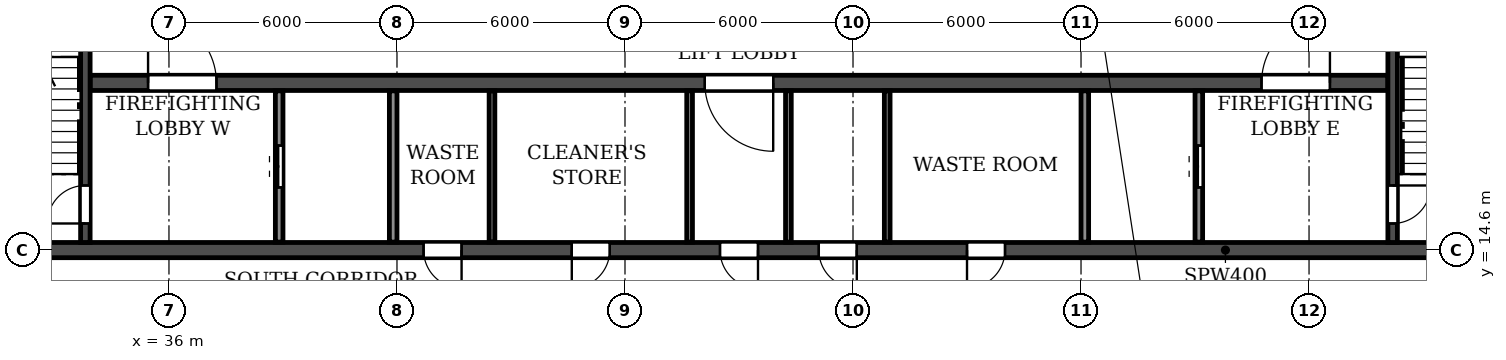
"""IFC4 building model, lengths in metres.
Left out: names, types, materials, properties, quantities, classifications, styles, units other than length and angle.
Written with IfcOpenShell. Run it as: python <this file> out.ifc"""

import sys

from ifc_helpers import new_model, si_unit, direction, frame, frame_2d, origin, place, context, subcontext, project, spatial, rectangle, extrude, element, fill, save


model = new_model("IFC4")
c1 = context("Model", 3, precision=1e-05, world=origin(), true_north=direction((0.0, 1.0)))
c2 = subcontext(c1, "Body", "Model", "MODEL_VIEW")
j1 = project(units=[si_unit("LENGTHUNIT", "METRE"), si_unit("PLANEANGLEUNIT", "RADIAN")], contexts=[c1])
p1 = place(None, origin())
s1 = spatial("IfcSite", under=j1, at=p1, CompositionType="ELEMENT")
p2 = place(p1, origin())
s2 = spatial("IfcBuilding", under=s1, at=p2, CompositionType="ELEMENT")
p3 = place(p2, frame((0.0, 0.0, 181.8)))
s3 = spatial("IfcBuildingStorey", under=s2, at=p3, CompositionType="ELEMENT", Elevation=181.8)
p4 = place(p3, frame((18.2, 14.6, 0.0), z_axis=(0.0, 0.0, 1.0), x_axis=(1.0, 0.0, 0.0)))
e1 = element("IfcWall", 1, at=p4, inside=s3, PredefinedType="SOLIDWALL", context=c2, shape_type="SweptSolid", body=[
    extrude(rectangle(XDim=65.6, YDim=0.4, at=frame_2d((32.8, 0.0))), origin(), (0.0, 0.0, 1.0), 3.08),
])
p5 = place(p4, frame((0.7, 0.0, 0.0)))
e2 = element("IfcOpeningElement", 2, at=p5, cuts=e1, PredefinedType="OPENING", context=c2, shape_type="SweptSolid", body=[
    extrude(rectangle(XDim=1.0, YDim=2.1, at=frame_2d((0.5, 1.05))), frame((0.0, 0.21, 0.0), z_axis=(0.0, -1.0, 0.0), x_axis=(1.0, 0.0, 0.0)), (0.0, 0.0, 1.0), 0.42),
])
p6 = place(p4, frame((8.6, 0.0, 0.0)))
e3 = element("IfcOpeningElement", 3, at=p6, cuts=e1, PredefinedType="OPENING", context=c2, shape_type="SweptSolid", body=[
    extrude(rectangle(XDim=1.0, YDim=2.1, at=frame_2d((0.5, 1.05))), frame((0.0, 0.21, 0.0), z_axis=(0.0, -1.0, 0.0), x_axis=(1.0, 0.0, 0.0)), (0.0, 0.0, 1.0), 0.42),
])
p7 = place(p4, frame((13.2, 0.0, 0.0)))
e4 = element("IfcOpeningElement", 4, at=p7, cuts=e1, PredefinedType="OPENING", context=c2, shape_type="SweptSolid", body=[
    extrude(rectangle(XDim=1.0, YDim=2.1, at=frame_2d((0.5, 1.05))), frame((0.0, 0.21, 0.0), z_axis=(0.0, -1.0, 0.0), x_axis=(1.0, 0.0, 0.0)), (0.0, 0.0, 1.0), 0.42),
])
p8 = place(p4, frame((24.5, 0.0, 0.0)))
e5 = element("IfcOpeningElement", 5, at=p8, cuts=e1, PredefinedType="OPENING", context=c2, shape_type="SweptSolid", body=[
    extrude(rectangle(XDim=1.0, YDim=2.1, at=frame_2d((0.5, 1.05))), frame((0.0, 0.21, 0.0), z_axis=(0.0, -1.0, 0.0), x_axis=(1.0, 0.0, 0.0)), (0.0, 0.0, 1.0), 0.42),
])
p9 = place(p4, frame((28.4, 0.0, 0.0)))
e6 = element("IfcOpeningElement", 6, at=p9, cuts=e1, PredefinedType="OPENING", context=c2, shape_type="SweptSolid", body=[
    extrude(rectangle(XDim=1.0, YDim=2.1, at=frame_2d((0.5, 1.05))), frame((0.0, 0.21, 0.0), z_axis=(0.0, -1.0, 0.0), x_axis=(1.0, 0.0, 0.0)), (0.0, 0.0, 1.0), 0.42),
])
p10 = place(p4, frame((32.3, 0.0, 0.0)))
e7 = element("IfcOpeningElement", 7, at=p10, cuts=e1, PredefinedType="OPENING", context=c2, shape_type="SweptSolid", body=[
    extrude(rectangle(XDim=1.0, YDim=2.1, at=frame_2d((0.5, 1.05))), frame((0.0, 0.21, 0.0), z_axis=(0.0, -1.0, 0.0), x_axis=(1.0, 0.0, 0.0)), (0.0, 0.0, 1.0), 0.42),
])
p11 = place(p4, frame((34.9, 0.0, 0.0)))
e8 = element("IfcOpeningElement", 8, at=p11, cuts=e1, PredefinedType="OPENING", context=c2, shape_type="SweptSolid", body=[
    extrude(rectangle(XDim=1.0, YDim=2.1, at=frame_2d((0.5, 1.05))), frame((0.0, 0.21, 0.0), z_axis=(0.0, -1.0, 0.0), x_axis=(1.0, 0.0, 0.0)), (0.0, 0.0, 1.0), 0.42),
])
p12 = place(p4, frame((38.8, 0.0, 0.0)))
e9 = element("IfcOpeningElement", 9, at=p12, cuts=e1, PredefinedType="OPENING", context=c2, shape_type="SweptSolid", body=[
    extrude(rectangle(XDim=1.0, YDim=2.1, at=frame_2d((0.5, 1.05))), frame((0.0, 0.21, 0.0), z_axis=(0.0, -1.0, 0.0), x_axis=(1.0, 0.0, 0.0)), (0.0, 0.0, 1.0), 0.42),
])
p13 = place(p4, frame((51.4, 0.0, 0.0)))
e10 = element("IfcOpeningElement", 10, at=p13, cuts=e1, PredefinedType="OPENING", context=c2, shape_type="SweptSolid", body=[
    extrude(rectangle(XDim=1.0, YDim=2.1, at=frame_2d((0.5, 1.05))), frame((0.0, 0.21, 0.0), z_axis=(0.0, -1.0, 0.0), x_axis=(1.0, 0.0, 0.0)), (0.0, 0.0, 1.0), 0.42),
])
p14 = place(p4, frame((56.0, 0.0, 0.0)))
e11 = element("IfcOpeningElement", 11, at=p14, cuts=e1, PredefinedType="OPENING", context=c2, shape_type="SweptSolid", body=[
    extrude(rectangle(XDim=1.0, YDim=2.1, at=frame_2d((0.5, 1.05))), frame((0.0, 0.21, 0.0), z_axis=(0.0, -1.0, 0.0), x_axis=(1.0, 0.0, 0.0)), (0.0, 0.0, 1.0), 0.42),
])
p15 = place(p4, frame((63.9, 0.0, 0.0)))
e12 = element("IfcOpeningElement", 12, at=p15, cuts=e1, PredefinedType="OPENING", context=c2, shape_type="SweptSolid", body=[
    extrude(rectangle(XDim=1.0, YDim=2.1, at=frame_2d((0.5, 1.05))), frame((0.0, 0.21, 0.0), z_axis=(0.0, -1.0, 0.0), x_axis=(1.0, 0.0, 0.0)), (0.0, 0.0, 1.0), 0.42),
])
p16 = place(p3, frame((33.925, 19.0, 0.0), z_axis=(0.0, 0.0, 1.0), x_axis=(1.0, 0.0, 0.0)))
e13 = element("IfcWall", 13, at=p16, inside=s3, PredefinedType="SOLIDWALL", context=c2, shape_type="SweptSolid", body=[
    extrude(rectangle(XDim=34.15, YDim=0.4, at=frame_2d((17.075, 0.0))), origin(), (0.0, 0.0, 1.0), 3.08),
])
p17 = place(p16, frame((16.175, 0.0, 0.0)))
e14 = element("IfcOpeningElement", 14, at=p17, cuts=e13, PredefinedType="OPENING", context=c2, shape_type="SweptSolid", body=[
    extrude(rectangle(XDim=1.8, YDim=2.1, at=frame_2d((0.9, 1.05))), frame((0.0, 0.21, 0.0), z_axis=(0.0, -1.0, 0.0), x_axis=(1.0, 0.0, 0.0)), (0.0, 0.0, 1.0), 0.42),
])
p18 = place(p16, frame((1.525, 0.0, 0.0)))
e15 = element("IfcOpeningElement", 15, at=p18, cuts=e13, PredefinedType="OPENING", context=c2, shape_type="SweptSolid", body=[
    extrude(rectangle(XDim=1.8, YDim=2.1, at=frame_2d((0.9, 1.05))), frame((0.0, 0.21, 0.0), z_axis=(0.0, -1.0, 0.0), x_axis=(1.0, 0.0, 0.0)), (0.0, 0.0, 1.0), 0.42),
])
p19 = place(p16, frame((30.825, 0.0, 0.0)))
e16 = element("IfcOpeningElement", 16, at=p19, cuts=e13, PredefinedType="OPENING", context=c2, shape_type="SweptSolid", body=[
    extrude(rectangle(XDim=1.8, YDim=2.1, at=frame_2d((0.9, 1.05))), frame((0.0, 0.21, 0.0), z_axis=(0.0, -1.0, 0.0), x_axis=(1.0, 0.0, 0.0)), (0.0, 0.0, 1.0), 0.42),
])
p20 = place(p3, frame((33.8, 14.8, 0.0), z_axis=(0.0, 0.0, 1.0), x_axis=(0.0, 1.0, 0.0)))
e17 = element("IfcWall", 17, at=p20, inside=s3, PredefinedType="SOLIDWALL", context=c2, shape_type="SweptSolid", body=[
    extrude(rectangle(XDim=7.675, YDim=0.25, at=frame_2d((3.837, 0.0))), origin(), (0.0, 0.0, 1.0), 3.08),
])
p21 = place(p20, frame((0.5, 0.0, 0.0)))
e18 = element("IfcOpeningElement", 18, at=p21, cuts=e17, PredefinedType="OPENING", context=c2, shape_type="SweptSolid", body=[
    extrude(rectangle(XDim=1.0, YDim=2.1, at=frame_2d((0.5, 1.05))), frame((0.0, 0.135, 0.0), z_axis=(0.0, -1.0, 0.0), x_axis=(1.0, 0.0, 0.0)), (0.0, 0.0, 1.0), 0.27),
])
p22 = place(p3, frame((68.2, 14.8, 0.0), z_axis=(0.0, 0.0, 1.0), x_axis=(0.0, 1.0, 0.0)))
e19 = element("IfcWall", 19, at=p22, inside=s3, PredefinedType="SOLIDWALL", context=c2, shape_type="SweptSolid", body=[
    extrude(rectangle(XDim=7.675, YDim=0.25, at=frame_2d((3.837, 0.0))), origin(), (0.0, 0.0, 1.0), 3.08),
])
p23 = place(p22, frame((0.5, 0.0, 0.0)))
e20 = element("IfcOpeningElement", 20, at=p23, cuts=e19, PredefinedType="OPENING", context=c2, shape_type="SweptSolid", body=[
    extrude(rectangle(XDim=1.0, YDim=2.1, at=frame_2d((0.5, 1.05))), frame((0.0, 0.135, 0.0), z_axis=(0.0, -1.0, 0.0), x_axis=(1.0, 0.0, 0.0)), (0.0, 0.0, 1.0), 0.27),
])
for number, where, z_axis, x_axis in (
    (21, (49.7, 14.81, 0.0), (0.0, 0.0, 1.0), (0.0, 1.0, 0.0)),
    (22, (52.3, 14.81, 0.0), (0.0, 0.0, 1.0), (0.0, 1.0, 0.0)),
    (23, (44.5, 14.81, 0.0), (0.0, 0.0, 1.0), (0.0, 1.0, 0.0)),
    (24, (54.9, 14.81, 0.0), (0.0, 0.0, 1.0), (0.0, 1.0, 0.0)),
):
    element("IfcWall", number, at=place(p3, frame(where, z_axis=z_axis, x_axis=x_axis)), inside=s3, PredefinedType="PARTITIONING", context=c2, shape_type="SweptSolid", body=[
        extrude(rectangle(XDim=3.98, YDim=0.15, at=frame_2d((1.99, 0.0))), origin(), (0.0, 0.0, 1.0), 3.08),
    ])
p24 = place(p3, frame((38.9, 14.81, 0.0), z_axis=(0.0, 0.0, 1.0), x_axis=(0.0, 1.0, 0.0)))
e25 = element("IfcWall", 25, at=p24, inside=s3, PredefinedType="PARTITIONING", context=c2, shape_type="SweptSolid", body=[
    extrude(rectangle(XDim=3.98, YDim=0.2, at=frame_2d((1.99, 0.0))), origin(), (0.0, 0.0, 1.0), 3.08),
])
p25 = place(p24, frame((1.44, 0.0, 0.0)))
e26 = element("IfcOpeningElement", 26, at=p25, cuts=e25, PredefinedType="OPENING", context=c2, shape_type="SweptSolid", body=[
    extrude(rectangle(XDim=1.1, YDim=2.1, at=frame_2d((0.55, 1.05))), frame((0.0, 0.11, 0.0), z_axis=(0.0, -1.0, 0.0), x_axis=(1.0, 0.0, 0.0)), (0.0, 0.0, 1.0), 0.22),
])
for number, where, z_axis, x_axis in (
    (27, (41.9, 14.81, 0.0), (0.0, 0.0, 1.0), (0.0, 1.0, 0.0)),
    (28, (60.1, 14.81, 0.0), (0.0, 0.0, 1.0), (0.0, 1.0, 0.0)),
):
    element("IfcWall", number, at=place(p3, frame(where, z_axis=z_axis, x_axis=x_axis)), inside=s3, PredefinedType="PARTITIONING", context=c2, shape_type="SweptSolid", body=[
        extrude(rectangle(XDim=3.98, YDim=0.2, at=frame_2d((1.99, 0.0))), origin(), (0.0, 0.0, 1.0), 3.08),
    ])
p26 = place(p3, frame((63.1, 14.81, 0.0), z_axis=(0.0, 0.0, 1.0), x_axis=(0.0, 1.0, 0.0)))
e29 = element("IfcWall", 29, at=p26, inside=s3, PredefinedType="PARTITIONING", context=c2, shape_type="SweptSolid", body=[
    extrude(rectangle(XDim=3.98, YDim=0.2, at=frame_2d((1.99, 0.0))), origin(), (0.0, 0.0, 1.0), 3.08),
])
p27 = place(p26, frame((1.44, 0.0, 0.0)))
e30 = element("IfcOpeningElement", 30, at=p27, cuts=e29, PredefinedType="OPENING", context=c2, shape_type="SweptSolid", body=[
    extrude(rectangle(XDim=1.1, YDim=2.1, at=frame_2d((0.55, 1.05))), frame((0.0, 0.11, 0.0), z_axis=(0.0, -1.0, 0.0), x_axis=(1.0, 0.0, 0.0)), (0.0, 0.0, 1.0), 0.22),
])
p28 = place(p8, frame((1.0, 0.0, 0.0), z_axis=(0.0, 0.0, 1.0), x_axis=(-1.0, 0.0, 0.0)))
e31 = element("IfcDoor", 31, at=p28, inside=s3, OperationType="SINGLE_SWING_LEFT", PredefinedType="DOOR", context=c2, shape_type="SweptSolid", body=[
    extrude(rectangle(XDim=1.0, YDim=2.1, at=frame_2d((0.5, 1.05))), frame((0.0, 0.025, 0.0), z_axis=(0.0, -1.0, 0.0), x_axis=(1.0, 0.0, 0.0)), (0.0, 0.0, 1.0), 0.05),
])
fill(e5, e31)
p29 = place(p9, frame((1.0, 0.0, 0.0), z_axis=(0.0, 0.0, 1.0), x_axis=(-1.0, 0.0, 0.0)))
e32 = element("IfcDoor", 32, at=p29, inside=s3, OperationType="SINGLE_SWING_RIGHT", PredefinedType="DOOR", context=c2, shape_type="SweptSolid", body=[
    extrude(rectangle(XDim=1.0, YDim=2.1, at=frame_2d((0.5, 1.05))), frame((0.0, 0.025, 0.0), z_axis=(0.0, -1.0, 0.0), x_axis=(1.0, 0.0, 0.0)), (0.0, 0.0, 1.0), 0.05),
])
fill(e6, e32)
p30 = place(p10, frame((1.0, 0.0, 0.0), z_axis=(0.0, 0.0, 1.0), x_axis=(-1.0, 0.0, 0.0)))
e33 = element("IfcDoor", 33, at=p30, inside=s3, OperationType="SINGLE_SWING_LEFT", PredefinedType="DOOR", context=c2, shape_type="SweptSolid", body=[
    extrude(rectangle(XDim=1.0, YDim=2.1, at=frame_2d((0.5, 1.05))), frame((0.0, 0.025, 0.0), z_axis=(0.0, -1.0, 0.0), x_axis=(1.0, 0.0, 0.0)), (0.0, 0.0, 1.0), 0.05),
])
fill(e7, e33)
p31 = place(p11, frame((1.0, 0.0, 0.0), z_axis=(0.0, 0.0, 1.0), x_axis=(-1.0, 0.0, 0.0)))
e34 = element("IfcDoor", 34, at=p31, inside=s3, OperationType="SINGLE_SWING_LEFT", PredefinedType="DOOR", context=c2, shape_type="SweptSolid", body=[
    extrude(rectangle(XDim=1.0, YDim=2.1, at=frame_2d((0.5, 1.05))), frame((0.0, 0.025, 0.0), z_axis=(0.0, -1.0, 0.0), x_axis=(1.0, 0.0, 0.0)), (0.0, 0.0, 1.0), 0.05),
])
fill(e8, e34)
p32 = place(p12, frame((1.0, 0.0, 0.0), z_axis=(0.0, 0.0, 1.0), x_axis=(-1.0, 0.0, 0.0)))
e35 = element("IfcDoor", 35, at=p32, inside=s3, OperationType="SINGLE_SWING_RIGHT", PredefinedType="DOOR", context=c2, shape_type="SweptSolid", body=[
    extrude(rectangle(XDim=1.0, YDim=2.1, at=frame_2d((0.5, 1.05))), frame((0.0, 0.025, 0.0), z_axis=(0.0, -1.0, 0.0), x_axis=(1.0, 0.0, 0.0)), (0.0, 0.0, 1.0), 0.05),
])
fill(e9, e35)
p33 = place(p27, origin())
e36 = element("IfcDoor", 36, at=p33, inside=s3, OperationType="DOUBLE_DOOR_SLIDING", PredefinedType="DOOR", context=c2, shape_type="SweptSolid", body=[
    extrude(rectangle(XDim=1.1, YDim=2.1, at=frame_2d((0.55, 1.05))), frame((0.0, 0.025, 0.0), z_axis=(0.0, -1.0, 0.0), x_axis=(1.0, 0.0, 0.0)), (0.0, 0.0, 1.0), 0.05),
])
fill(e30, e36)
p34 = place(p23, frame((1.0, 0.0, 0.0), z_axis=(0.0, 0.0, 1.0), x_axis=(-1.0, 0.0, 0.0)))
e37 = element("IfcDoor", 37, at=p34, inside=s3, OperationType="SINGLE_SWING_LEFT", PredefinedType="DOOR", context=c2, shape_type="SweptSolid", body=[
    extrude(rectangle(XDim=1.0, YDim=2.1, at=frame_2d((0.5, 1.05))), frame((0.0, 0.025, 0.0), z_axis=(0.0, -1.0, 0.0), x_axis=(1.0, 0.0, 0.0)), (0.0, 0.0, 1.0), 0.05),
])
fill(e20, e37)
p35 = place(p21, origin())
e38 = element("IfcDoor", 38, at=p35, inside=s3, OperationType="SINGLE_SWING_LEFT", PredefinedType="DOOR", context=c2, shape_type="SweptSolid", body=[
    extrude(rectangle(XDim=1.0, YDim=2.1, at=frame_2d((0.5, 1.05))), frame((0.0, 0.025, 0.0), z_axis=(0.0, -1.0, 0.0), x_axis=(1.0, 0.0, 0.0)), (0.0, 0.0, 1.0), 0.05),
])
fill(e18, e38)
p36 = place(p25, origin())
e39 = element("IfcDoor", 39, at=p36, inside=s3, OperationType="DOUBLE_DOOR_SLIDING", PredefinedType="DOOR", context=c2, shape_type="SweptSolid", body=[
    extrude(rectangle(XDim=1.1, YDim=2.1, at=frame_2d((0.55, 1.05))), frame((0.0, 0.025, 0.0), z_axis=(0.0, -1.0, 0.0), x_axis=(1.0, 0.0, 0.0)), (0.0, 0.0, 1.0), 0.05),
])
fill(e26, e39)
p37 = place(p17, frame((1.8, 0.0, 0.0), z_axis=(0.0, 0.0, 1.0), x_axis=(-1.0, 0.0, 0.0)))
e40 = element("IfcDoor", 40, at=p37, inside=s3, OperationType="DOUBLE_DOOR_SINGLE_SWING", PredefinedType="DOOR", context=c2, shape_type="SweptSolid", body=[
    extrude(rectangle(XDim=1.8, YDim=2.1, at=frame_2d((0.9, 1.05))), frame((0.0, 0.025, 0.0), z_axis=(0.0, -1.0, 0.0), x_axis=(1.0, 0.0, 0.0)), (0.0, 0.0, 1.0), 0.05),
])
fill(e14, e40)
p38 = place(p18, origin())
e41 = element("IfcDoor", 41, at=p38, inside=s3, OperationType="DOUBLE_DOOR_SINGLE_SWING", PredefinedType="DOOR", context=c2, shape_type="SweptSolid", body=[
    extrude(rectangle(XDim=1.8, YDim=2.1, at=frame_2d((0.9, 1.05))), frame((0.0, 0.025, 0.0), z_axis=(0.0, -1.0, 0.0), x_axis=(1.0, 0.0, 0.0)), (0.0, 0.0, 1.0), 0.05),
])
fill(e15, e41)
p39 = place(p19, origin())
e42 = element("IfcDoor", 42, at=p39, inside=s3, OperationType="DOUBLE_DOOR_SINGLE_SWING", PredefinedType="DOOR", context=c2, shape_type="SweptSolid", body=[
    extrude(rectangle(XDim=1.8, YDim=2.1, at=frame_2d((0.9, 1.05))), frame((0.0, 0.025, 0.0), z_axis=(0.0, -1.0, 0.0), x_axis=(1.0, 0.0, 0.0)), (0.0, 0.0, 1.0), 0.05),
])
fill(e16, e42)
save(model, sys.argv[1])
